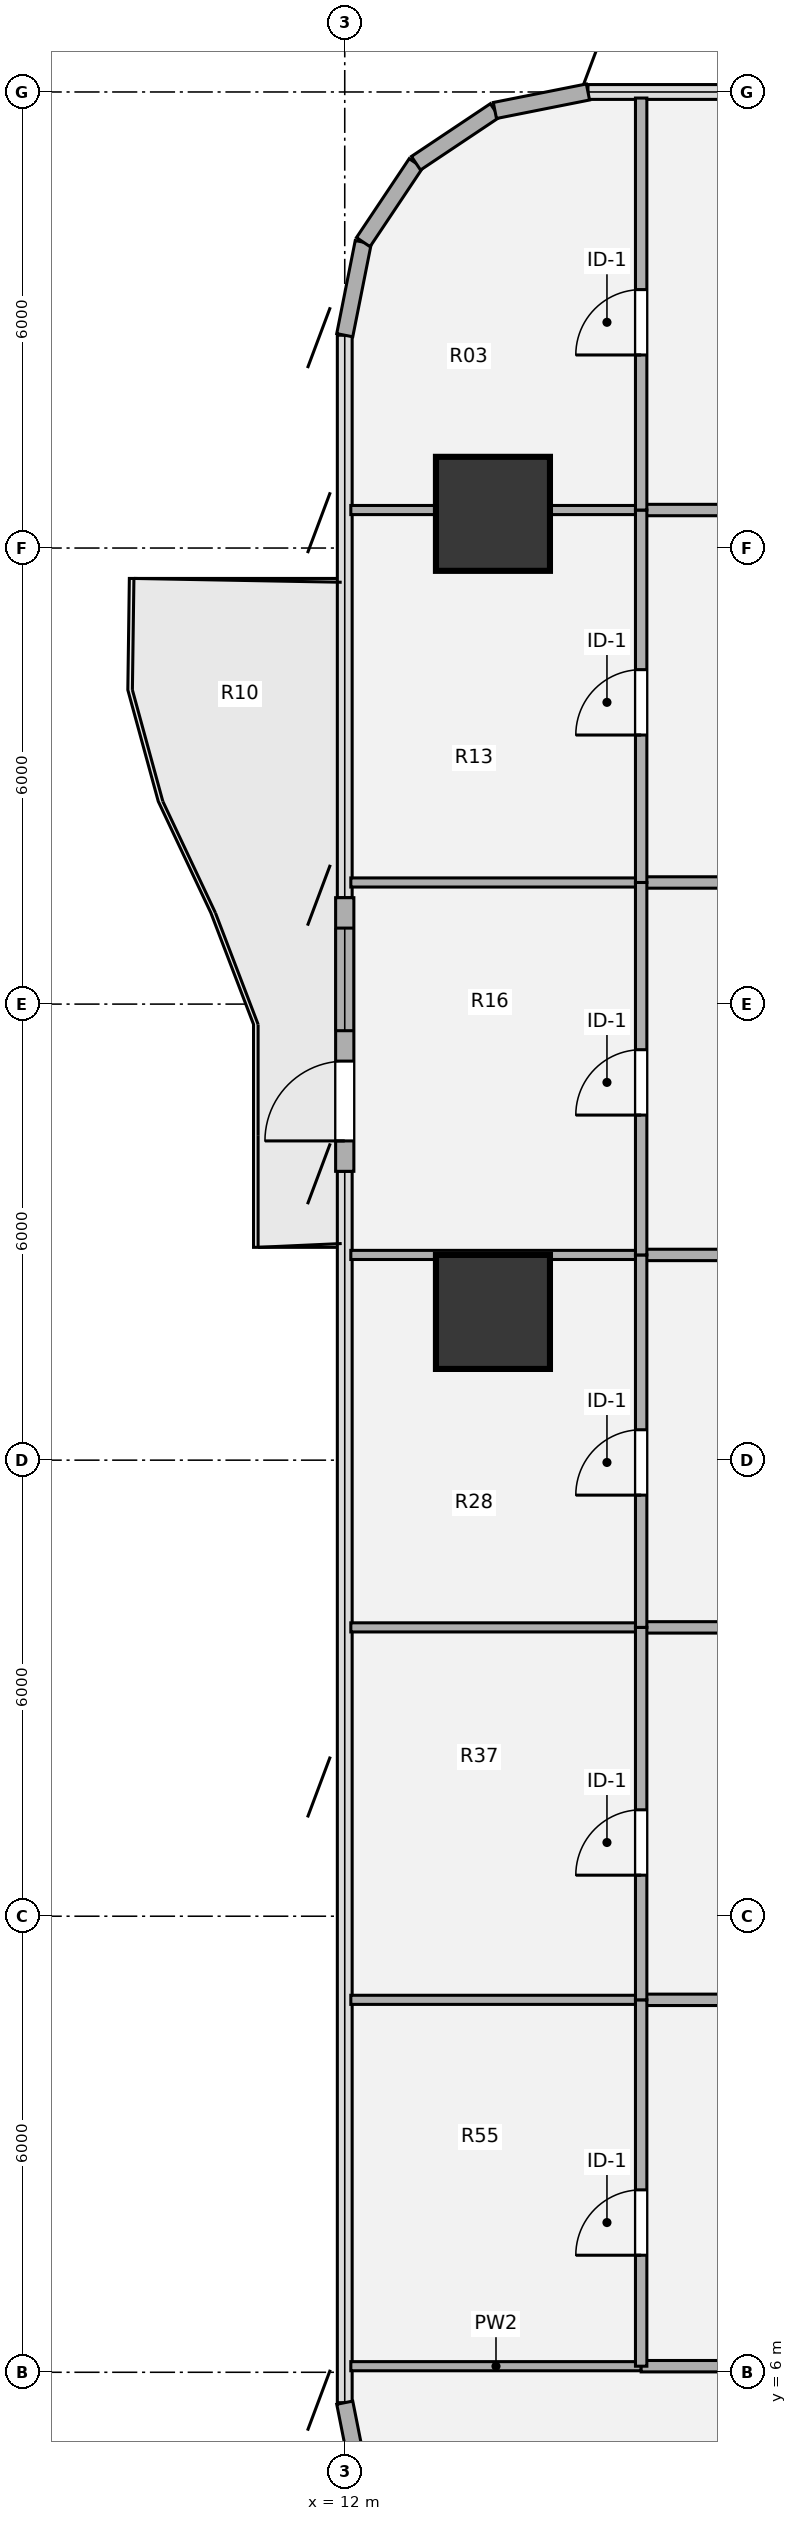
"""IFC4 building model, lengths in metres.
Left out: names, types, materials, properties, quantities, classifications, styles, units other than length and angle.
Written with IfcOpenShell. Run it as: python <this file> out.ifc"""

import sys

from ifc_helpers import new_model, si_unit, direction, frame, frame_2d, origin, origin_2d, place, context, subcontext, project, spatial, rectangle, hollow_circle, extrude, source, transform, mapped, element, fill, save


model = new_model("IFC4")
c1 = context("Model", 3, precision=1e-05, world=origin(), true_north=direction((0.0, 1.0)))
c2 = subcontext(c1, "Body", "Model", "MODEL_VIEW")
j1 = project(units=[si_unit("LENGTHUNIT", "METRE"), si_unit("PLANEANGLEUNIT", "RADIAN")], contexts=[c1])
p1 = place(None, origin())
s1 = spatial("IfcSite", under=j1, at=p1, CompositionType="ELEMENT")
p2 = place(p1, origin())
s2 = spatial("IfcBuilding", under=s1, at=p2, CompositionType="ELEMENT")
p3 = place(p2, frame((0.0, 0.0, 64.8)))
s3 = spatial("IfcBuildingStorey", under=s2, at=p3, CompositionType="ELEMENT", Elevation=64.8)
m1 = source(origin(), c2, "Body", "SweptSolid", [
    extrude(hollow_circle(Radius=0.75, WallThickness=0.05, at=origin_2d()), origin(), (0.0, 0.0, 1.0), 3.78),
])
for number, where, z_axis, x_axis in (
    (1, (13.95, 19.95, 0.0), (0.0, 0.0, 1.0), (1.0, 0.0, 0.0)),
    (2, (13.95, 30.45, 0.0), (0.0, 0.0, 1.0), (1.0, 0.0, 0.0)),
):
    element("IfcColumn", number, at=place(p3, frame(where, z_axis=z_axis, x_axis=x_axis)), inside=s3, PredefinedType="COLUMN", context=c2, shape_type="MappedRepresentation", body=[
        mapped(m1, transform((0.0, 0.0, 0.0), x_axis=(1.0, 0.0, 0.0), y_axis=(0.0, 1.0, 0.0), z_axis=(0.0, 0.0, 1.0), scale=1.0)),
    ])
p4 = place(p3, frame((12.244, 4.375, 0.0), z_axis=(0.0, 0.0, 1.0), x_axis=(-0.195138390419, 0.980775717779, 0.0)))
e3 = element("IfcWall", 3, at=p4, inside=s3, PredefinedType="SOLIDWALL", context=c2, shape_type="SweptSolid", body=[
    extrude(rectangle(XDim=1.249, YDim=0.215, at=frame_2d((0.624, 0.0))), origin(), (0.0, 0.0, 1.0), 3.53),
])
p5 = place(p3, frame((12.0, 21.8, 0.0), z_axis=(0.0, 0.0, 1.0), x_axis=(0.0, 1.0, 0.0)))
e4 = element("IfcWall", 4, at=p5, inside=s3, PredefinedType="SOLIDWALL", context=c2, shape_type="SweptSolid", body=[
    extrude(rectangle(XDim=3.6, YDim=0.24, at=frame_2d((1.8, 0.0))), origin(), (0.0, 0.0, 1.0), 3.53),
])
p6 = place(p5, frame((0.4, 0.0, 0.0)))
e5 = element("IfcOpeningElement", 5, at=p6, cuts=e4, PredefinedType="OPENING", context=c2, shape_type="SweptSolid", body=[
    extrude(rectangle(XDim=1.05, YDim=2.15, at=origin_2d()), frame((0.525, 0.13, 1.075), z_axis=(0.0, -1.0, 0.0), x_axis=(1.0, 0.0, 0.0)), (0.0, 0.0, 1.0), 0.26),
])
p7 = place(p5, frame((1.85, 0.0, 0.85)))
e6 = element("IfcOpeningElement", 6, at=p7, cuts=e4, PredefinedType="OPENING", context=c2, shape_type="SweptSolid", body=[
    extrude(rectangle(XDim=1.35, YDim=1.35, at=origin_2d()), frame((0.675, 0.13, 0.675), z_axis=(0.0, -1.0, 0.0), x_axis=(1.0, 0.0, 0.0)), (0.0, 0.0, 1.0), 0.26),
])
for number, where, z_axis, x_axis in (
    (7, (12.0, 32.8, 0.0), (0.0, 0.0, 1.0), (0.195, 0.981, 0.0)),
    (8, (12.244, 34.025, 0.0), (0.0, 0.0, 1.0), (0.556, 0.831, 0.0)),
    (9, (12.937, 35.063, 0.0), (0.0, 0.0, 1.0), (0.831, 0.556, 0.0)),
    (10, (13.975, 35.756, 0.0), (0.0, 0.0, 1.0), (0.981, 0.195, 0.0)),
):
    element("IfcWall", number, at=place(p3, frame(where, z_axis=z_axis, x_axis=x_axis)), inside=s3, PredefinedType="SOLIDWALL", context=c2, shape_type="SweptSolid", body=[
        extrude(rectangle(XDim=1.249, YDim=0.215, at=frame_2d((0.624, 0.0))), origin(), (0.0, 0.0, 1.0), 3.53),
    ])
p8 = place(p3, frame((12.08, 6.08, 0.0), z_axis=(0.0, 0.0, 1.0), x_axis=(1.0, 0.0, 0.0)))
e11 = element("IfcWall", 11, at=p8, inside=s3, PredefinedType="PARTITIONING", context=c2, shape_type="SweptSolid", body=[
    extrude(rectangle(XDim=3.82, YDim=0.12, at=frame_2d((1.91, 0.0))), origin(), (0.0, 0.0, 1.0), 3.5),
])
p9 = place(p3, frame((15.9, 6.08, 0.0), z_axis=(0.0, 0.0, 1.0), x_axis=(1.0, 0.0, 0.0)))
e12 = element("IfcWall", 12, at=p9, inside=s3, PredefinedType="PARTITIONING", context=c2, shape_type="SweptSolid", body=[
    extrude(rectangle(XDim=6.2, YDim=0.15, at=frame_2d((3.1, 0.0))), origin(), (0.0, 0.0, 1.0), 3.5),
])
p10 = place(p3, frame((12.08, 10.9, 0.0), z_axis=(0.0, 0.0, 1.0), x_axis=(1.0, 0.0, 0.0)))
e13 = element("IfcWall", 13, at=p10, inside=s3, PredefinedType="PARTITIONING", context=c2, shape_type="SweptSolid", body=[
    extrude(rectangle(XDim=3.82, YDim=0.12, at=frame_2d((1.91, 0.0))), origin(), (0.0, 0.0, 1.0), 3.5),
])
p11 = place(p3, frame((15.9, 10.9, 0.0), z_axis=(0.0, 0.0, 1.0), x_axis=(1.0, 0.0, 0.0)))
e14 = element("IfcWall", 14, at=p11, inside=s3, PredefinedType="PARTITIONING", context=c2, shape_type="SweptSolid", body=[
    extrude(rectangle(XDim=6.2, YDim=0.15, at=frame_2d((3.1, 0.0))), origin(), (0.0, 0.0, 1.0), 3.5),
])
p12 = place(p3, frame((12.08, 15.8, 0.0), z_axis=(0.0, 0.0, 1.0), x_axis=(1.0, 0.0, 0.0)))
e15 = element("IfcWall", 15, at=p12, inside=s3, PredefinedType="PARTITIONING", context=c2, shape_type="SweptSolid", body=[
    extrude(rectangle(XDim=3.82, YDim=0.12, at=frame_2d((1.91, 0.0))), origin(), (0.0, 0.0, 1.0), 3.5),
])
p13 = place(p3, frame((15.9, 15.8, 0.0), z_axis=(0.0, 0.0, 1.0), x_axis=(1.0, 0.0, 0.0)))
e16 = element("IfcWall", 16, at=p13, inside=s3, PredefinedType="PARTITIONING", context=c2, shape_type="SweptSolid", body=[
    extrude(rectangle(XDim=6.2, YDim=0.15, at=frame_2d((3.1, 0.0))), origin(), (0.0, 0.0, 1.0), 3.5),
])
p14 = place(p3, frame((12.08, 20.7, 0.0), z_axis=(0.0, 0.0, 1.0), x_axis=(1.0, 0.0, 0.0)))
e17 = element("IfcWall", 17, at=p14, inside=s3, PredefinedType="PARTITIONING", context=c2, shape_type="SweptSolid", body=[
    extrude(rectangle(XDim=3.82, YDim=0.12, at=frame_2d((1.91, 0.0))), origin(), (0.0, 0.0, 1.0), 2.982),
])
p15 = place(p3, frame((15.9, 20.7, 0.0), z_axis=(0.0, 0.0, 1.0), x_axis=(1.0, 0.0, 0.0)))
e18 = element("IfcWall", 18, at=p15, inside=s3, PredefinedType="PARTITIONING", context=c2, shape_type="SweptSolid", body=[
    extrude(rectangle(XDim=6.2, YDim=0.15, at=frame_2d((3.1, 0.0))), origin(), (0.0, 0.0, 1.0), 2.982),
])
p16 = place(p3, frame((12.08, 25.6, 0.0), z_axis=(0.0, 0.0, 1.0), x_axis=(1.0, 0.0, 0.0)))
e19 = element("IfcWall", 19, at=p16, inside=s3, PredefinedType="PARTITIONING", context=c2, shape_type="SweptSolid", body=[
    extrude(rectangle(XDim=3.82, YDim=0.12, at=frame_2d((1.91, 0.0))), origin(), (0.0, 0.0, 1.0), 2.982),
])
p17 = place(p3, frame((15.9, 25.6, 0.0), z_axis=(0.0, 0.0, 1.0), x_axis=(1.0, 0.0, 0.0)))
e20 = element("IfcWall", 20, at=p17, inside=s3, PredefinedType="PARTITIONING", context=c2, shape_type="SweptSolid", body=[
    extrude(rectangle(XDim=6.2, YDim=0.15, at=frame_2d((3.1, 0.0))), origin(), (0.0, 0.0, 1.0), 2.982),
])
p18 = place(p3, frame((12.08, 30.5, 0.0), z_axis=(0.0, 0.0, 1.0), x_axis=(1.0, 0.0, 0.0)))
e21 = element("IfcWall", 21, at=p18, inside=s3, PredefinedType="PARTITIONING", context=c2, shape_type="SweptSolid", body=[
    extrude(rectangle(XDim=3.82, YDim=0.12, at=frame_2d((1.91, 0.0))), origin(), (0.0, 0.0, 1.0), 2.903),
])
p19 = place(p3, frame((15.9, 30.5, 0.0), z_axis=(0.0, 0.0, 1.0), x_axis=(1.0, 0.0, 0.0)))
e22 = element("IfcWall", 22, at=p19, inside=s3, PredefinedType="PARTITIONING", context=c2, shape_type="SweptSolid", body=[
    extrude(rectangle(XDim=6.2, YDim=0.15, at=frame_2d((3.1, 0.0))), origin(), (0.0, 0.0, 1.0), 2.903),
])
p20 = place(p3, frame((15.9, 6.08, 0.0), z_axis=(0.0, 0.0, 1.0), x_axis=(0.0, 1.0, 0.0)))
e23 = element("IfcWall", 23, at=p20, inside=s3, PredefinedType="PARTITIONING", context=c2, shape_type="SweptSolid", body=[
    extrude(rectangle(XDim=4.82, YDim=0.15, at=frame_2d((2.41, 0.0))), origin(), (0.0, 0.0, 1.0), 3.5),
])
p21 = place(p20, frame((1.46, 0.0, 0.0)))
e24 = element("IfcOpeningElement", 24, at=p21, cuts=e23, PredefinedType="OPENING", context=c2, shape_type="SweptSolid", body=[
    extrude(rectangle(XDim=0.86, YDim=2.1, at=origin_2d()), frame((0.43, 0.085, 1.05), z_axis=(0.0, -1.0, 0.0), x_axis=(1.0, 0.0, 0.0)), (0.0, 0.0, 1.0), 0.17),
])
p22 = place(p3, frame((15.9, 10.9, 0.0), z_axis=(0.0, 0.0, 1.0), x_axis=(0.0, 1.0, 0.0)))
e25 = element("IfcWall", 25, at=p22, inside=s3, PredefinedType="PARTITIONING", context=c2, shape_type="SweptSolid", body=[
    extrude(rectangle(XDim=4.9, YDim=0.15, at=frame_2d((2.45, 0.0))), origin(), (0.0, 0.0, 1.0), 3.5),
])
p23 = place(p22, frame((1.64, 0.0, 0.0)))
e26 = element("IfcOpeningElement", 26, at=p23, cuts=e25, PredefinedType="OPENING", context=c2, shape_type="SweptSolid", body=[
    extrude(rectangle(XDim=0.86, YDim=2.1, at=origin_2d()), frame((0.43, 0.085, 1.05), z_axis=(0.0, -1.0, 0.0), x_axis=(1.0, 0.0, 0.0)), (0.0, 0.0, 1.0), 0.17),
])
p24 = place(p3, frame((15.9, 15.8, 0.0), z_axis=(0.0, 0.0, 1.0), x_axis=(0.0, 1.0, 0.0)))
e27 = element("IfcWall", 27, at=p24, inside=s3, PredefinedType="PARTITIONING", context=c2, shape_type="SweptSolid", body=[
    extrude(rectangle(XDim=4.9, YDim=0.15, at=frame_2d((2.45, 0.0))), origin(), (0.0, 0.0, 1.0), 3.5),
])
p25 = place(p24, frame((1.74, 0.0, 0.0)))
e28 = element("IfcOpeningElement", 28, at=p25, cuts=e27, PredefinedType="OPENING", context=c2, shape_type="SweptSolid", body=[
    extrude(rectangle(XDim=0.86, YDim=2.1, at=origin_2d()), frame((0.43, 0.085, 1.05), z_axis=(0.0, -1.0, 0.0), x_axis=(1.0, 0.0, 0.0)), (0.0, 0.0, 1.0), 0.17),
])
p26 = place(p3, frame((15.9, 20.7, 0.0), z_axis=(0.0, 0.0, 1.0), x_axis=(0.0, 1.0, 0.0)))
e29 = element("IfcWall", 29, at=p26, inside=s3, PredefinedType="PARTITIONING", context=c2, shape_type="SweptSolid", body=[
    extrude(rectangle(XDim=4.9, YDim=0.15, at=frame_2d((2.45, 0.0))), origin(), (0.0, 0.0, 1.0), 3.5),
])
p27 = place(p26, frame((1.84, 0.0, 0.0)))
e30 = element("IfcOpeningElement", 30, at=p27, cuts=e29, PredefinedType="OPENING", context=c2, shape_type="SweptSolid", body=[
    extrude(rectangle(XDim=0.86, YDim=2.1, at=origin_2d()), frame((0.43, 0.085, 1.05), z_axis=(0.0, -1.0, 0.0), x_axis=(1.0, 0.0, 0.0)), (0.0, 0.0, 1.0), 0.17),
])
p28 = place(p3, frame((15.9, 25.6, 0.0), z_axis=(0.0, 0.0, 1.0), x_axis=(0.0, 1.0, 0.0)))
e31 = element("IfcWall", 31, at=p28, inside=s3, PredefinedType="PARTITIONING", context=c2, shape_type="SweptSolid", body=[
    extrude(rectangle(XDim=4.9, YDim=0.15, at=frame_2d((2.45, 0.0))), origin(), (0.0, 0.0, 1.0), 3.5),
])
p29 = place(p28, frame((1.94, 0.0, 0.0)))
e32 = element("IfcOpeningElement", 32, at=p29, cuts=e31, PredefinedType="OPENING", context=c2, shape_type="SweptSolid", body=[
    extrude(rectangle(XDim=0.86, YDim=2.1, at=origin_2d()), frame((0.43, 0.085, 1.05), z_axis=(0.0, -1.0, 0.0), x_axis=(1.0, 0.0, 0.0)), (0.0, 0.0, 1.0), 0.17),
])
p30 = place(p3, frame((15.9, 30.5, 0.0), z_axis=(0.0, 0.0, 1.0), x_axis=(0.0, 1.0, 0.0)))
e33 = element("IfcWall", 33, at=p30, inside=s3, PredefinedType="PARTITIONING", context=c2, shape_type="SweptSolid", body=[
    extrude(rectangle(XDim=5.42, YDim=0.15, at=frame_2d((2.71, 0.0))), origin(), (0.0, 0.0, 1.0), 3.5),
])
p31 = place(p30, frame((2.04, 0.0, 0.0)))
e34 = element("IfcOpeningElement", 34, at=p31, cuts=e33, PredefinedType="OPENING", context=c2, shape_type="SweptSolid", body=[
    extrude(rectangle(XDim=0.86, YDim=2.1, at=origin_2d()), frame((0.43, 0.085, 1.05), z_axis=(0.0, -1.0, 0.0), x_axis=(1.0, 0.0, 0.0)), (0.0, 0.0, 1.0), 0.17),
])
m2 = source(origin(), c2, "Body", "SweptSolid", [
    extrude(rectangle(XDim=1.05, YDim=2.15, at=origin_2d()), frame((0.525, 0.025, 1.075), z_axis=(0.0, -1.0, 0.0), x_axis=(1.0, 0.0, 0.0)), (0.0, 0.0, 1.0), 0.05),
])
p32 = place(p6, origin())
e35 = element("IfcDoor", 35, at=p32, inside=s3, OperationType="SINGLE_SWING_LEFT", PredefinedType="DOOR", context=c2, shape_type="MappedRepresentation", body=[
    mapped(m2, transform((0.0, 0.0, 0.0), x_axis=(1.0, 0.0, 0.0), y_axis=(0.0, 1.0, 0.0), z_axis=(0.0, 0.0, 1.0), scale=1.0)),
])
fill(e5, e35)
m3 = source(origin(), c2, "Body", "SweptSolid", [
    extrude(rectangle(XDim=1.35, YDim=1.35, at=origin_2d()), frame((0.675, 0.03, 0.675), z_axis=(0.0, -1.0, 0.0), x_axis=(1.0, 0.0, 0.0)), (0.0, 0.0, 1.0), 0.06),
])
p33 = place(p7, origin())
e36 = element("IfcWindow", 36, at=p33, inside=s3, PartitioningType="SINGLE_PANEL", PredefinedType="WINDOW", context=c2, shape_type="MappedRepresentation", body=[
    mapped(m3, transform((0.0, 0.0, 0.0), x_axis=(1.0, 0.0, 0.0), y_axis=(0.0, 1.0, 0.0), z_axis=(0.0, 0.0, 1.0), scale=1.0)),
])
fill(e6, e36)
m4 = source(origin(), c2, "Body", "SweptSolid", [
    extrude(rectangle(XDim=0.86, YDim=2.1, at=origin_2d()), frame((0.43, 0.025, 1.05), z_axis=(0.0, -1.0, 0.0), x_axis=(1.0, 0.0, 0.0)), (0.0, 0.0, 1.0), 0.05),
])
p34 = place(p21, origin())
e37 = element("IfcDoor", 37, at=p34, inside=s3, OperationType="SINGLE_SWING_LEFT", PredefinedType="DOOR", context=c2, shape_type="MappedRepresentation", body=[
    mapped(m4, transform((0.0, 0.0, 0.0), x_axis=(1.0, 0.0, 0.0), y_axis=(0.0, 1.0, 0.0), z_axis=(0.0, 0.0, 1.0), scale=1.0)),
])
fill(e24, e37)
p35 = place(p23, origin())
e38 = element("IfcDoor", 38, at=p35, inside=s3, OperationType="SINGLE_SWING_LEFT", PredefinedType="DOOR", context=c2, shape_type="MappedRepresentation", body=[
    mapped(m4, transform((0.0, 0.0, 0.0), x_axis=(1.0, 0.0, 0.0), y_axis=(0.0, 1.0, 0.0), z_axis=(0.0, 0.0, 1.0), scale=1.0)),
])
fill(e26, e38)
p36 = place(p25, origin())
e39 = element("IfcDoor", 39, at=p36, inside=s3, OperationType="SINGLE_SWING_LEFT", PredefinedType="DOOR", context=c2, shape_type="MappedRepresentation", body=[
    mapped(m4, transform((0.0, 0.0, 0.0), x_axis=(1.0, 0.0, 0.0), y_axis=(0.0, 1.0, 0.0), z_axis=(0.0, 0.0, 1.0), scale=1.0)),
])
fill(e28, e39)
p37 = place(p27, origin())
e40 = element("IfcDoor", 40, at=p37, inside=s3, OperationType="SINGLE_SWING_LEFT", PredefinedType="DOOR", context=c2, shape_type="MappedRepresentation", body=[
    mapped(m4, transform((0.0, 0.0, 0.0), x_axis=(1.0, 0.0, 0.0), y_axis=(0.0, 1.0, 0.0), z_axis=(0.0, 0.0, 1.0), scale=1.0)),
])
fill(e30, e40)
p38 = place(p29, origin())
e41 = element("IfcDoor", 41, at=p38, inside=s3, OperationType="SINGLE_SWING_LEFT", PredefinedType="DOOR", context=c2, shape_type="MappedRepresentation", body=[
    mapped(m4, transform((0.0, 0.0, 0.0), x_axis=(1.0, 0.0, 0.0), y_axis=(0.0, 1.0, 0.0), z_axis=(0.0, 0.0, 1.0), scale=1.0)),
])
fill(e32, e41)
p39 = place(p31, origin())
e42 = element("IfcDoor", 42, at=p39, inside=s3, OperationType="SINGLE_SWING_LEFT", PredefinedType="DOOR", context=c2, shape_type="MappedRepresentation", body=[
    mapped(m4, transform((0.0, 0.0, 0.0), x_axis=(1.0, 0.0, 0.0), y_axis=(0.0, 1.0, 0.0), z_axis=(0.0, 0.0, 1.0), scale=1.0)),
])
fill(e34, e42)
save(model, sys.argv[1])
